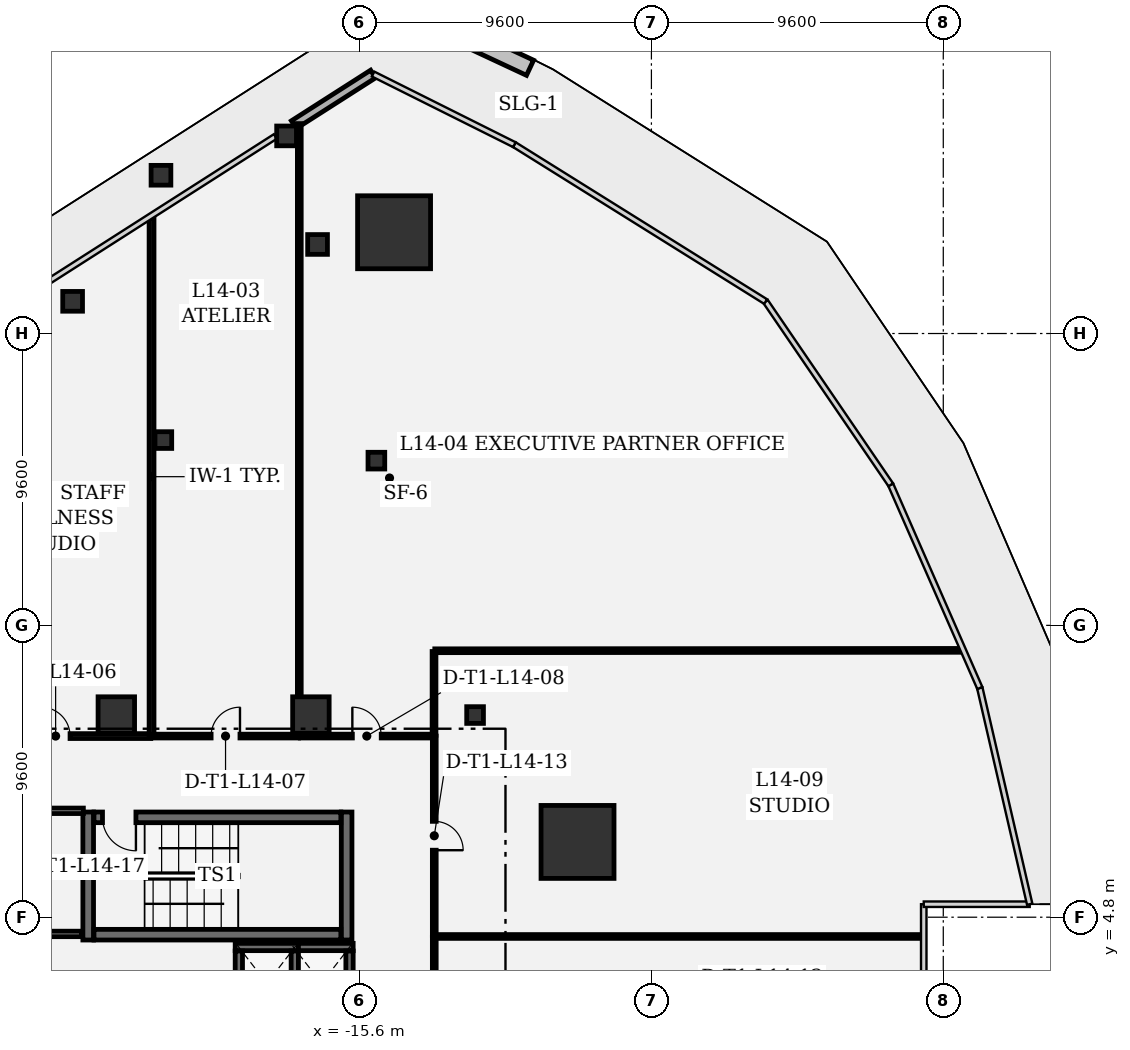
"""IFC4 building model, lengths in metres.
Left out: names, types, materials, properties, quantities, classifications, styles, units other than length and angle.
Written with IfcOpenShell. Run it as: python <this file> out.ifc"""

import sys

from ifc_helpers import new_model, si_unit, direction, frame, frame_2d, origin, origin_2d, place, context, subcontext, project, spatial, rectangle, extrude, element, fill, save


model = new_model("IFC4")
c1 = context("Model", 3, precision=1e-05, world=origin(), true_north=direction((0.0, 1.0)))
c2 = subcontext(c1, "Body", "Model", "MODEL_VIEW")
j1 = project(units=[si_unit("LENGTHUNIT", "METRE"), si_unit("PLANEANGLEUNIT", "RADIAN")], contexts=[c1])
p1 = place(None, origin())
s1 = spatial("IfcSite", under=j1, at=p1, CompositionType="ELEMENT")
p2 = place(p1, origin())
s2 = spatial("IfcBuilding", under=s1, at=p2, CompositionType="ELEMENT")
p3 = place(p2, frame((0.0, 0.0, 66.0)))
s3 = spatial("IfcBuildingStorey", under=s2, at=p3, CompositionType="ELEMENT", Elevation=66.0)
for number, where, z_axis, x_axis in (
    (1, (-8.43, 7.276, 0.0), (0.0, 0.0, 1.0), (1.0, 0.0, 0.0)),
    (2, (-14.464, 27.331, 0.0), (0.0, 0.0, 1.0), (1.0, 0.0, 0.0)),
):
    element("IfcColumn", number, at=place(p3, frame(where, z_axis=z_axis, x_axis=x_axis)), inside=s3, PredefinedType="COLUMN", context=c2, shape_type="SweptSolid", body=[
        extrude(rectangle(XDim=2.4, YDim=2.4, at=origin_2d()), origin(), (0.0, 0.0, 1.0), 4.2),
    ])
for number, where, z_axis, x_axis in (
    (3, (-23.6, 11.45, 0.0), (0.0, 0.0, 1.0), (1.0, 0.0, 0.0)),
    (4, (-17.2, 11.45, 0.0), (0.0, 0.0, 1.0), (1.0, 0.0, 0.0)),
):
    element("IfcColumn", number, at=place(p3, frame(where, z_axis=z_axis, x_axis=x_axis)), inside=s3, PredefinedType="COLUMN", context=c2, shape_type="SweptSolid", body=[
        extrude(rectangle(XDim=1.2, YDim=1.2, at=origin_2d()), origin(), (0.0, 0.0, 1.0), 4.2),
    ])
for number, where, z_axis, x_axis in (
    (5, (-22.131, 29.206, 0.0), (0.0, 0.0, 1.0), (1.0, 0.0, 0.0)),
    (6, (-18.0, 30.5, 0.0), (0.0, 0.0, 1.0), (1.0, 0.0, 0.0)),
    (7, (-25.038, 25.059, 0.0), (0.0, 0.0, 1.0), (1.0, 0.0, 0.0)),
    (8, (-16.981, 26.929, 0.0), (0.0, 0.0, 1.0), (1.0, 0.0, 0.0)),
):
    element("IfcColumn", number, at=place(p3, frame(where, z_axis=z_axis, x_axis=x_axis)), inside=s3, PredefinedType="COLUMN", context=c2, shape_type="SweptSolid", body=[
        extrude(rectangle(XDim=0.65, YDim=0.65, at=origin_2d()), origin(), (0.0, 0.0, 1.0), 4.2),
    ])
for number, where, z_axis, x_axis in (
    (9, (-22.053, 20.495, 0.0), (0.0, 0.0, 1.0), (1.0, 0.0, 0.0)),
    (10, (-15.046, 19.818, 0.0), (0.0, 0.0, 1.0), (1.0, 0.0, 0.0)),
    (11, (-11.8, 11.45, 0.0), (0.0, 0.0, 1.0), (1.0, 0.0, 0.0)),
):
    element("IfcColumn", number, at=place(p3, frame(where, z_axis=z_axis, x_axis=x_axis)), inside=s3, PredefinedType="COLUMN", context=c2, shape_type="SweptSolid", body=[
        extrude(rectangle(XDim=0.55, YDim=0.55, at=origin_2d()), origin(), (0.0, 0.0, 1.0), 4.2),
    ])
p4 = place(p3, frame((-17.76, 30.87, 0.0), z_axis=(0.0, 0.0, 1.0), x_axis=(0.842632568885, 0.538488954254, 0.0)))
e12 = element("IfcWall", 12, at=p4, inside=s3, PredefinedType="SOLIDWALL", context=c2, shape_type="SweptSolid", body=[
    extrude(rectangle(XDim=3.092, YDim=0.3, at=frame_2d((1.546, 0.0))), origin(), (0.0, 0.0, 1.0), 3.92),
])
for number, where, z_axis, x_axis in (
    (13, (-24.525, 8.26, 0.0), (0.0, 0.0, 1.0), (0.0, -1.0, 0.0)),
    (14, (-16.025, 4.05, 0.0), (0.0, 0.0, 1.0), (0.0, 1.0, 0.0)),
):
    element("IfcWall", number, at=place(p3, frame(where, z_axis=z_axis, x_axis=x_axis)), inside=s3, PredefinedType="SHEAR", context=c2, shape_type="SweptSolid", body=[
        extrude(rectangle(XDim=4.21, YDim=0.35, at=frame_2d((2.105, 0.0))), origin(), (0.0, 0.0, 1.0), 3.92),
    ])
p5 = place(p3, frame((-24.335, 4.225, 0.0), z_axis=(0.0, 0.0, 1.0), x_axis=(1.0, 0.0, 0.0)))
e15 = element("IfcWall", 15, at=p5, inside=s3, PredefinedType="SHEAR", context=c2, shape_type="SweptSolid", body=[
    extrude(rectangle(XDim=8.12, YDim=0.35, at=frame_2d((4.06, 0.0))), origin(), (0.0, 0.0, 1.0), 3.92),
])
p6 = place(p3, frame((-16.215, 8.085, 0.0), z_axis=(0.0, 0.0, 1.0), x_axis=(-1.0, 0.0, 0.0)))
e16 = element("IfcWall", 16, at=p6, inside=s3, PredefinedType="SHEAR", context=c2, shape_type="SweptSolid", body=[
    extrude(rectangle(XDim=8.12, YDim=0.35, at=frame_2d((4.06, 0.0))), origin(), (0.0, 0.0, 1.0), 3.92),
])
p7 = place(p6, frame((6.74, 0.0, 0.0)))
e17 = element("IfcOpeningElement", 17, at=p7, cuts=e16, PredefinedType="OPENING", context=c2, shape_type="SweptSolid", body=[
    extrude(rectangle(XDim=1.1, YDim=2.2, at=frame_2d((0.55, 1.1))), frame((0.0, 0.185, 0.0), z_axis=(0.0, -1.0, 0.0), x_axis=(1.0, 0.0, 0.0)), (0.0, 0.0, 1.0), 0.37),
])
p8 = place(p3, frame((-19.69, 3.82, 0.0), z_axis=(0.0, 0.0, 1.0), x_axis=(1.0, 0.0, 0.0)))
e18 = element("IfcWall", 18, at=p8, inside=s3, PredefinedType="SHEAR", context=c2, shape_type="SweptSolid", body=[
    extrude(rectangle(XDim=2.08, YDim=0.24, at=frame_2d((1.04, 0.0))), origin(), (0.0, 0.0, 1.0), 3.92),
])
for number, where, z_axis, x_axis in (
    (19, (-19.57, 1.562, 0.0), (0.0, 0.0, 1.0), (0.0, 1.0, 0.0)),
    (20, (-17.73, 3.688, 0.0), (0.0, 0.0, 1.0), (0.0, -1.0, 0.0)),
):
    element("IfcWall", number, at=place(p3, frame(where, z_axis=z_axis, x_axis=x_axis)), inside=s3, PredefinedType="SHEAR", context=c2, shape_type="SweptSolid", body=[
        extrude(rectangle(XDim=2.126, YDim=0.24, at=frame_2d((1.063, 0.0))), origin(), (0.0, 0.0, 1.0), 3.92),
    ])
p9 = place(p3, frame((-17.61, 3.82, 0.0), z_axis=(0.0, 0.0, 1.0), x_axis=(1.0, 0.0, 0.0)))
e21 = element("IfcWall", 21, at=p9, inside=s3, PredefinedType="SHEAR", context=c2, shape_type="SweptSolid", body=[
    extrude(rectangle(XDim=1.8, YDim=0.24, at=frame_2d((0.9, 0.0))), origin(), (0.0, 0.0, 1.0), 3.92),
])
p10 = place(p3, frame((-15.93, 3.688, 0.0), z_axis=(0.0, 0.0, 1.0), x_axis=(0.0, -1.0, 0.0)))
e22 = element("IfcWall", 22, at=p10, inside=s3, PredefinedType="SHEAR", context=c2, shape_type="SweptSolid", body=[
    extrude(rectangle(XDim=2.126, YDim=0.24, at=frame_2d((1.063, 0.0))), origin(), (0.0, 0.0, 1.0), 3.92),
])
p11 = place(p3, frame((-28.355, 4.25, 0.0), z_axis=(0.0, 0.0, 1.0), x_axis=(1.0, 0.0, 0.0)))
e23 = element("IfcWall", 23, at=p11, inside=s3, PredefinedType="PARTITIONING", context=c2, shape_type="SweptSolid", body=[
    extrude(rectangle(XDim=3.622, YDim=0.18, at=frame_2d((1.811, 0.0))), origin(), (0.0, 0.0, 1.0), 3.92),
])
p12 = place(p3, frame((-24.684, 8.3, 0.0), z_axis=(0.0, 0.0, 1.0), x_axis=(-1.0, 0.0, 0.0)))
e24 = element("IfcWall", 24, at=p12, inside=s3, PredefinedType="PARTITIONING", context=c2, shape_type="SweptSolid", body=[
    extrude(rectangle(XDim=3.671, YDim=0.18, at=frame_2d((1.835, 0.0))), origin(), (0.0, 0.0, 1.0), 3.92),
])
p13 = place(p12, frame((1.335, 0.0, 0.0)))
e25 = element("IfcOpeningElement", 25, at=p13, cuts=e24, PredefinedType="OPENING", context=c2, shape_type="SweptSolid", body=[
    extrude(rectangle(XDim=1.0, YDim=2.15, at=frame_2d((0.5, 1.075))), frame((0.0, 0.1, 0.0), z_axis=(0.0, -1.0, 0.0), x_axis=(1.0, 0.0, 0.0)), (0.0, 0.0, 1.0), 0.2),
])
p14 = place(p3, frame((-28.727, 10.758, 0.0), z_axis=(0.0, 0.0, 1.0), x_axis=(1.0, 0.0, 0.0)))
e26 = element("IfcWall", 26, at=p14, inside=s3, PredefinedType="PARTITIONING", context=c2, shape_type="SweptSolid", body=[
    extrude(rectangle(XDim=6.26, YDim=0.16, at=frame_2d((3.13, 0.0))), origin(), (0.0, 0.0, 1.0), 3.92),
])
p15 = place(p14, frame((2.655, 0.0, 0.0)))
e27 = element("IfcOpeningElement", 27, at=p15, cuts=e26, PredefinedType="OPENING", context=c2, shape_type="SweptSolid", body=[
    extrude(rectangle(XDim=0.95, YDim=2.15, at=frame_2d((0.475, 1.075))), frame((0.0, 0.09, 0.0), z_axis=(0.0, -1.0, 0.0), x_axis=(1.0, 0.0, 0.0)), (0.0, 0.0, 1.0), 0.18),
])
p16 = place(p3, frame((-22.441, 10.783, 0.0), z_axis=(0.0, 0.0, 1.0), x_axis=(0.0, 1.0, 0.0)))
e28 = element("IfcWall", 28, at=p16, inside=s3, PredefinedType="PARTITIONING", context=c2, shape_type="SweptSolid", body=[
    extrude(rectangle(XDim=17.015, YDim=0.16, at=frame_2d((8.508, 0.0))), origin(), (0.0, 0.0, 1.0), 2.957),
])
p17 = place(p3, frame((-22.408, 10.758, 0.0), z_axis=(0.0, 0.0, 1.0), x_axis=(1.0, 0.0, 0.0)))
e29 = element("IfcWall", 29, at=p17, inside=s3, PredefinedType="PARTITIONING", context=c2, shape_type="SweptSolid", body=[
    extrude(rectangle(XDim=4.802, YDim=0.125, at=frame_2d((2.401, 0.0))), origin(), (0.0, 0.0, 1.0), 3.92),
])
p18 = place(p17, frame((1.926, 0.0, 0.0)))
e30 = element("IfcOpeningElement", 30, at=p18, cuts=e29, PredefinedType="OPENING", context=c2, shape_type="SweptSolid", body=[
    extrude(rectangle(XDim=0.95, YDim=2.15, at=frame_2d((0.475, 1.075))), frame((0.0, 0.073, 0.0), z_axis=(0.0, -1.0, 0.0), x_axis=(1.0, 0.0, 0.0)), (0.0, 0.0, 1.0), 0.145),
])
p19 = place(p3, frame((-17.582, 12.115, 0.0), z_axis=(0.0, 0.0, 1.0), x_axis=(0.0, 1.0, 0.0)))
e31 = element("IfcWall", 31, at=p19, inside=s3, PredefinedType="PARTITIONING", context=c2, shape_type="SweptSolid", body=[
    extrude(rectangle(XDim=18.789, YDim=0.125, at=frame_2d((9.395, 0.0))), origin(), (0.0, 0.0, 1.0), 2.957),
])
p20 = place(p3, frame((-17.549, 10.758, 0.0), z_axis=(0.0, 0.0, 1.0), x_axis=(1.0, 0.0, 0.0)))
e32 = element("IfcWall", 32, at=p20, inside=s3, PredefinedType="PARTITIONING", context=c2, shape_type="SweptSolid", body=[
    extrude(rectangle(XDim=4.374, YDim=0.125, at=frame_2d((2.187, 0.0))), origin(), (0.0, 0.0, 1.0), 2.957),
])
p21 = place(p20, frame((1.712, 0.0, 0.0)))
e33 = element("IfcOpeningElement", 33, at=p21, cuts=e32, PredefinedType="OPENING", context=c2, shape_type="SweptSolid", body=[
    extrude(rectangle(XDim=0.95, YDim=2.15, at=frame_2d((0.475, 1.075))), frame((0.0, 0.073, 0.0), z_axis=(0.0, -1.0, 0.0), x_axis=(1.0, 0.0, 0.0)), (0.0, 0.0, 1.0), 0.145),
])
p22 = place(p3, frame((-13.15, 13.54, 0.0), z_axis=(0.0, 0.0, 1.0), x_axis=(0.0, -1.0, 0.0)))
e34 = element("IfcWall", 34, at=p22, inside=s3, PredefinedType="PARTITIONING", context=c2, shape_type="SweptSolid", body=[
    extrude(rectangle(XDim=2.757, YDim=0.125, at=frame_2d((1.378, 0.0))), origin(), (0.0, 0.0, 1.0), 3.92),
])
p23 = place(p3, frame((-13.125, 13.565, 0.0), z_axis=(0.0, 0.0, 1.0), x_axis=(0.999999720425, 0.000747763554, 0.0)))
e35 = element("IfcWall", 35, at=p23, inside=s3, PredefinedType="PARTITIONING", context=c2, shape_type="SweptSolid", body=[
    extrude(rectangle(XDim=17.304, YDim=0.125, at=frame_2d((8.652, 0.0))), origin(), (0.0, 0.0, 1.0), 3.92),
])
p24 = place(p3, frame((2.878, 4.166, 0.0), z_axis=(0.0, 0.0, 1.0), x_axis=(-1.0, 0.0, 0.0)))
e36 = element("IfcWall", 36, at=p24, inside=s3, PredefinedType="PARTITIONING", context=c2, shape_type="SweptSolid", body=[
    extrude(rectangle(XDim=15.995, YDim=0.125, at=frame_2d((7.998, 0.0))), origin(), (0.0, 0.0, 1.0), 3.92),
])
p25 = place(p3, frame((-13.142, 4.141, 0.0), z_axis=(0.0, 0.0, 1.0), x_axis=(0.0, -1.0, 0.0)))
e37 = element("IfcWall", 37, at=p25, inside=s3, PredefinedType="PARTITIONING", context=c2, shape_type="SweptSolid", body=[
    extrude(rectangle(XDim=2.808, YDim=0.125, at=frame_2d((1.404, 0.0))), origin(), (0.0, 0.0, 1.0), 3.92),
])
p26 = place(p3, frame((-13.142, 10.758, 0.0), z_axis=(0.0, 0.0, 1.0), x_axis=(0.0, -1.0, 0.0)))
e38 = element("IfcWall", 38, at=p26, inside=s3, PredefinedType="PARTITIONING", context=c2, shape_type="SweptSolid", body=[
    extrude(rectangle(XDim=6.56, YDim=0.125, at=frame_2d((3.28, 0.0))), origin(), (0.0, 0.0, 1.0), 3.92),
])
p27 = place(p26, frame((2.805, 0.0, 0.0)))
e39 = element("IfcOpeningElement", 39, at=p27, cuts=e38, PredefinedType="OPENING", context=c2, shape_type="SweptSolid", body=[
    extrude(rectangle(XDim=0.95, YDim=2.15, at=frame_2d((0.475, 1.075))), frame((0.0, 0.073, 0.0), z_axis=(0.0, -1.0, 0.0), x_axis=(1.0, 0.0, 0.0)), (0.0, 0.0, 1.0), 0.145),
])
p28 = place(p7, origin())
e40 = element("IfcDoor", 40, at=p28, inside=s3, OperationType="SINGLE_SWING_LEFT", PredefinedType="DOOR", context=c2, shape_type="SweptSolid", body=[
    extrude(rectangle(XDim=1.1, YDim=2.2, at=frame_2d((0.55, 1.1))), frame((0.0, 0.025, 0.0), z_axis=(0.0, -1.0, 0.0), x_axis=(1.0, 0.0, 0.0)), (0.0, 0.0, 1.0), 0.05),
])
fill(e17, e40)
p29 = place(p15, origin())
e41 = element("IfcDoor", 41, at=p29, inside=s3, OperationType="SINGLE_SWING_LEFT", PredefinedType="DOOR", context=c2, shape_type="SweptSolid", body=[
    extrude(rectangle(XDim=0.95, YDim=2.15, at=frame_2d((0.475, 1.075))), frame((0.0, 0.025, 0.0), z_axis=(0.0, -1.0, 0.0), x_axis=(1.0, 0.0, 0.0)), (0.0, 0.0, 1.0), 0.05),
])
fill(e27, e41)
p30 = place(p18, origin())
e42 = element("IfcDoor", 42, at=p30, inside=s3, OperationType="SINGLE_SWING_RIGHT", PredefinedType="DOOR", context=c2, shape_type="SweptSolid", body=[
    extrude(rectangle(XDim=0.95, YDim=2.15, at=frame_2d((0.475, 1.075))), frame((0.0, 0.025, 0.0), z_axis=(0.0, -1.0, 0.0), x_axis=(1.0, 0.0, 0.0)), (0.0, 0.0, 1.0), 0.05),
])
fill(e30, e42)
p31 = place(p21, origin())
e43 = element("IfcDoor", 43, at=p31, inside=s3, OperationType="SINGLE_SWING_LEFT", PredefinedType="DOOR", context=c2, shape_type="SweptSolid", body=[
    extrude(rectangle(XDim=0.95, YDim=2.15, at=frame_2d((0.475, 1.075))), frame((0.0, 0.025, 0.0), z_axis=(0.0, -1.0, 0.0), x_axis=(1.0, 0.0, 0.0)), (0.0, 0.0, 1.0), 0.05),
])
fill(e33, e43)
p32 = place(p27, origin())
e44 = element("IfcDoor", 44, at=p32, inside=s3, OperationType="SINGLE_SWING_RIGHT", PredefinedType="DOOR", context=c2, shape_type="SweptSolid", body=[
    extrude(rectangle(XDim=0.95, YDim=2.15, at=frame_2d((0.475, 1.075))), frame((0.0, 0.025, 0.0), z_axis=(0.0, -1.0, 0.0), x_axis=(1.0, 0.0, 0.0)), (0.0, 0.0, 1.0), 0.05),
])
fill(e39, e44)
save(model, sys.argv[1])
